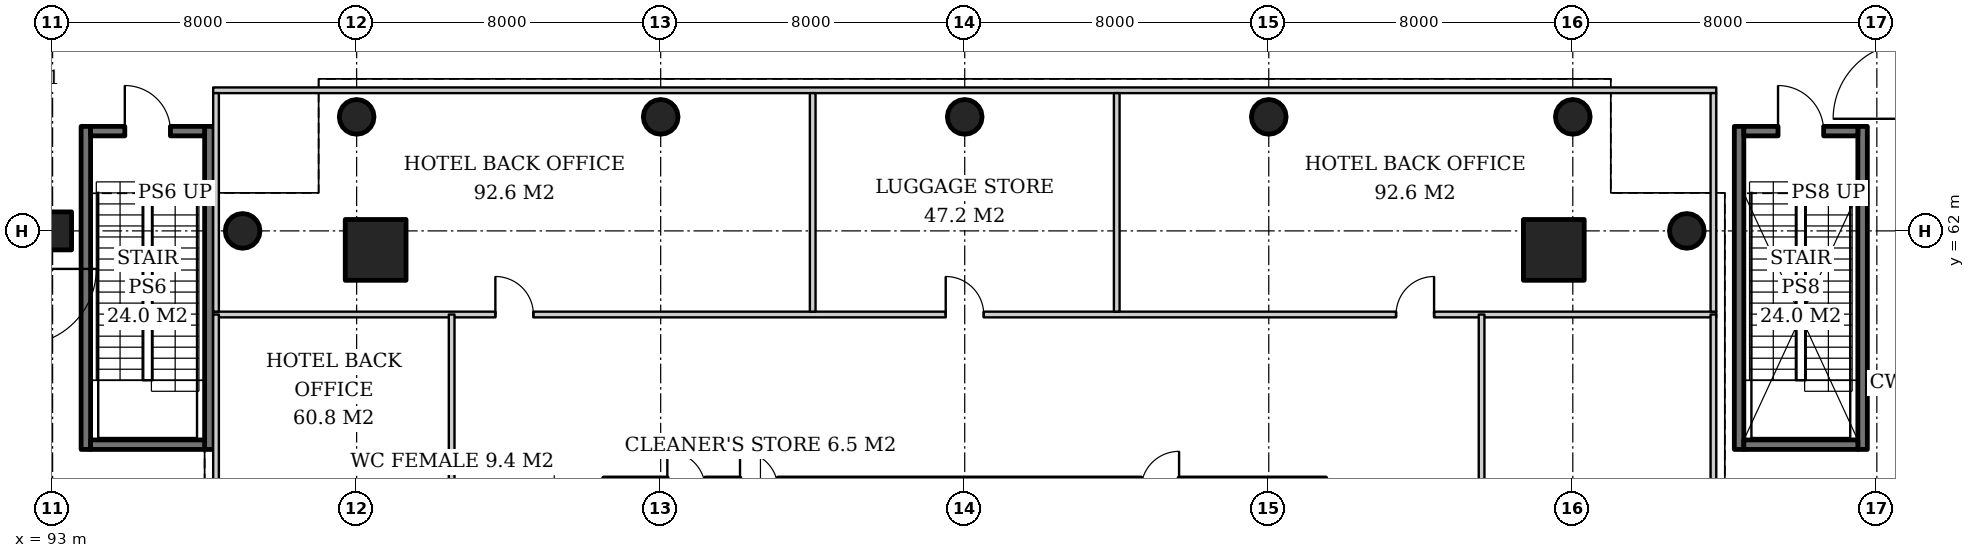
"""IFC4 building model, lengths in metres.
Left out: names, types, materials, properties, quantities, classifications, styles, units other than length and angle.
Written with IfcOpenShell. Run it as: python <this file> out.ifc"""

import sys

from ifc_helpers import new_model, si_unit, direction, frame, frame_2d, origin, origin_2d, place, context, subcontext, project, spatial, rectangle, hollow_circle, extrude, element, fill, save


model = new_model("IFC4")
c1 = context("Model", 3, precision=1e-05, world=origin(), true_north=direction((0.0, 1.0)))
c2 = subcontext(c1, "Body", "Model", "MODEL_VIEW")
j1 = project(units=[si_unit("LENGTHUNIT", "METRE"), si_unit("PLANEANGLEUNIT", "RADIAN")], contexts=[c1])
p1 = place(None, origin())
s1 = spatial("IfcSite", under=j1, at=p1, CompositionType="ELEMENT")
p2 = place(p1, origin())
s2 = spatial("IfcBuilding", under=s1, at=p2, CompositionType="ELEMENT")
p3 = place(p2, origin())
s3 = spatial("IfcBuildingStorey", under=s2, at=p3, CompositionType="ELEMENT", Elevation=0.0)
p4 = place(p3, frame((93.0, 62.0, 0.0), z_axis=(0.0, 0.0, 1.0), x_axis=(1.0, 0.0, 0.0)))
e1 = element("IfcColumn", 1, at=p4, inside=s3, PredefinedType="COLUMN", context=c2, shape_type="SweptSolid", body=[
    extrude(rectangle(XDim=1.0, YDim=1.0, at=origin_2d()), origin(), (0.0, 0.0, 1.0), 6.0),
])
p5 = place(p3, frame((132.5, 61.5, 0.0), z_axis=(0.0, 0.0, 1.0), x_axis=(1.0, 0.0, 0.0)))
e2 = element("IfcColumn", 2, at=p5, inside=s3, PredefinedType="COLUMN", context=c2, shape_type="SweptSolid", body=[
    extrude(rectangle(XDim=1.6, YDim=1.6, at=origin_2d()), origin(), (0.0, 0.0, 1.0), 6.0),
])
p6 = place(p3, frame((136.0, 62.0, 0.0), z_axis=(0.0, 0.0, 1.0), x_axis=(1.0, 0.0, 0.0)))
e3 = element("IfcColumn", 3, at=p6, inside=s3, PredefinedType="COLUMN", context=c2, shape_type="SweptSolid", body=[
    extrude(hollow_circle(Radius=0.457, WallThickness=0.03, at=origin_2d()), origin(), (0.0, 0.0, 1.0), 6.0),
])
p7 = place(p3, frame((101.5, 61.5, 0.0), z_axis=(0.0, 0.0, 1.0), x_axis=(1.0, 0.0, 0.0)))
e4 = element("IfcColumn", 4, at=p7, inside=s3, PredefinedType="COLUMN", context=c2, shape_type="SweptSolid", body=[
    extrude(rectangle(XDim=1.6, YDim=1.6, at=origin_2d()), origin(), (0.0, 0.0, 1.0), 6.0),
])
for number, where, z_axis, x_axis in (
    (5, (133.0, 65.0, 0.0), (0.0, 0.0, 1.0), (1.0, 0.0, 0.0)),
    (6, (101.0, 65.0, 0.0), (0.0, 0.0, 1.0), (1.0, 0.0, 0.0)),
    (7, (125.0, 65.0, 0.0), (0.0, 0.0, 1.0), (1.0, 0.0, 0.0)),
    (8, (117.0, 65.0, 0.0), (0.0, 0.0, 1.0), (1.0, 0.0, 0.0)),
    (9, (109.0, 65.0, 0.0), (0.0, 0.0, 1.0), (1.0, 0.0, 0.0)),
    (10, (98.0, 62.0, 0.0), (0.0, 0.0, 1.0), (1.0, 0.0, 0.0)),
):
    element("IfcColumn", number, at=place(p3, frame(where, z_axis=z_axis, x_axis=x_axis)), inside=s3, PredefinedType="COLUMN", context=c2, shape_type="SweptSolid", body=[
        extrude(hollow_circle(Radius=0.457, WallThickness=0.03, at=origin_2d()), origin(), (0.0, 0.0, 1.0), 6.0),
    ])
for number, where, z_axis, x_axis in (
    (11, (93.875, 56.25, 0.0), (0.0, 0.0, 1.0), (0.0, 1.0, 0.0)),
    (12, (97.125, 56.25, 0.0), (0.0, 0.0, 1.0), (0.0, 1.0, 0.0)),
):
    element("IfcWall", number, at=place(p3, frame(where, z_axis=z_axis, x_axis=x_axis)), inside=s3, PredefinedType="SOLIDWALL", context=c2, shape_type="SweptSolid", body=[
        extrude(rectangle(XDim=8.5, YDim=0.25, at=frame_2d((4.25, 0.0))), origin(), (0.0, 0.0, 1.0), 5.7),
    ])
p8 = place(p3, frame((94.0, 56.375, 0.0), z_axis=(0.0, 0.0, 1.0), x_axis=(1.0, 0.0, 0.0)))
e13 = element("IfcWall", 13, at=p8, inside=s3, PredefinedType="SOLIDWALL", context=c2, shape_type="SweptSolid", body=[
    extrude(rectangle(XDim=3.0, YDim=0.25, at=frame_2d((1.5, 0.0))), origin(), (0.0, 0.0, 1.0), 5.7),
])
p9 = place(p3, frame((94.0, 64.625, 0.0), z_axis=(0.0, 0.0, 1.0), x_axis=(1.0, 0.0, 0.0)))
e14 = element("IfcWall", 14, at=p9, inside=s3, PredefinedType="SOLIDWALL", context=c2, shape_type="SweptSolid", body=[
    extrude(rectangle(XDim=3.0, YDim=0.25, at=frame_2d((1.5, 0.0))), origin(), (0.0, 0.0, 1.0), 5.7),
])
p10 = place(p9, frame((0.9, 0.0, 0.0)))
e15 = element("IfcOpeningElement", 15, at=p10, cuts=e14, PredefinedType="OPENING", context=c2, shape_type="SweptSolid", body=[
    extrude(rectangle(XDim=1.2, YDim=2.1, at=frame_2d((0.6, 1.05))), frame((0.0, 0.135, 0.0), z_axis=(0.0, -1.0, 0.0), x_axis=(1.0, 0.0, 0.0)), (0.0, 0.0, 1.0), 0.27),
])
for number, where, z_axis, x_axis in (
    (16, (137.375, 56.25, 0.0), (0.0, 0.0, 1.0), (0.0, 1.0, 0.0)),
    (17, (140.625, 56.25, 0.0), (0.0, 0.0, 1.0), (0.0, 1.0, 0.0)),
):
    element("IfcWall", number, at=place(p3, frame(where, z_axis=z_axis, x_axis=x_axis)), inside=s3, PredefinedType="SOLIDWALL", context=c2, shape_type="SweptSolid", body=[
        extrude(rectangle(XDim=8.5, YDim=0.25, at=frame_2d((4.25, 0.0))), origin(), (0.0, 0.0, 1.0), 5.7),
    ])
p11 = place(p3, frame((137.5, 56.375, 0.0), z_axis=(0.0, 0.0, 1.0), x_axis=(1.0, 0.0, 0.0)))
e18 = element("IfcWall", 18, at=p11, inside=s3, PredefinedType="SOLIDWALL", context=c2, shape_type="SweptSolid", body=[
    extrude(rectangle(XDim=3.0, YDim=0.25, at=frame_2d((1.5, 0.0))), origin(), (0.0, 0.0, 1.0), 5.7),
])
p12 = place(p3, frame((137.5, 64.625, 0.0), z_axis=(0.0, 0.0, 1.0), x_axis=(1.0, 0.0, 0.0)))
e19 = element("IfcWall", 19, at=p12, inside=s3, PredefinedType="SOLIDWALL", context=c2, shape_type="SweptSolid", body=[
    extrude(rectangle(XDim=3.0, YDim=0.25, at=frame_2d((1.5, 0.0))), origin(), (0.0, 0.0, 1.0), 5.7),
])
p13 = place(p12, frame((0.9, 0.0, 0.0)))
e20 = element("IfcOpeningElement", 20, at=p13, cuts=e19, PredefinedType="OPENING", context=c2, shape_type="SweptSolid", body=[
    extrude(rectangle(XDim=1.2, YDim=2.1, at=frame_2d((0.6, 1.05))), frame((0.0, 0.135, 0.0), z_axis=(0.0, -1.0, 0.0), x_axis=(1.0, 0.0, 0.0)), (0.0, 0.0, 1.0), 0.27),
])
p14 = place(p3, frame((97.225, 59.8, 0.0), z_axis=(0.0, 0.0, 1.0), x_axis=(1.0, 0.0, 0.0)))
e21 = element("IfcWall", 21, at=p14, inside=s3, PredefinedType="PARTITIONING", context=c2, shape_type="SweptSolid", body=[
    extrude(rectangle(XDim=39.55, YDim=0.15, at=frame_2d((19.775, 0.0))), origin(), (0.0, 0.0, 1.0), 4.9),
])
p15 = place(p14, frame((7.425, 0.0, 0.0)))
e22 = element("IfcOpeningElement", 22, at=p15, cuts=e21, PredefinedType="OPENING", context=c2, shape_type="SweptSolid", body=[
    extrude(rectangle(XDim=1.0, YDim=2.1, at=frame_2d((0.5, 1.05))), frame((0.0, 0.085, 0.0), z_axis=(0.0, -1.0, 0.0), x_axis=(1.0, 0.0, 0.0)), (0.0, 0.0, 1.0), 0.17),
])
p16 = place(p14, frame((19.275, 0.0, 0.0)))
e23 = element("IfcOpeningElement", 23, at=p16, cuts=e21, PredefinedType="OPENING", context=c2, shape_type="SweptSolid", body=[
    extrude(rectangle(XDim=1.0, YDim=2.1, at=frame_2d((0.5, 1.05))), frame((0.0, 0.085, 0.0), z_axis=(0.0, -1.0, 0.0), x_axis=(1.0, 0.0, 0.0)), (0.0, 0.0, 1.0), 0.17),
])
p17 = place(p14, frame((31.125, 0.0, 0.0)))
e24 = element("IfcOpeningElement", 24, at=p17, cuts=e21, PredefinedType="OPENING", context=c2, shape_type="SweptSolid", body=[
    extrude(rectangle(XDim=1.0, YDim=2.1, at=frame_2d((0.5, 1.05))), frame((0.0, 0.085, 0.0), z_axis=(0.0, -1.0, 0.0), x_axis=(1.0, 0.0, 0.0)), (0.0, 0.0, 1.0), 0.17),
])
p18 = place(p3, frame((97.225, 65.7, 0.0), z_axis=(0.0, 0.0, 1.0), x_axis=(1.0, 0.0, 0.0)))
e25 = element("IfcWall", 25, at=p18, inside=s3, PredefinedType="PARTITIONING", context=c2, shape_type="SweptSolid", body=[
    extrude(rectangle(XDim=39.55, YDim=0.15, at=frame_2d((19.775, 0.0))), origin(), (0.0, 0.0, 1.0), 5.7),
])
for number, where, z_axis, x_axis in (
    (26, (97.3, 59.875, 0.0), (0.0, 0.0, 1.0), (0.0, 1.0, 0.0)),
    (27, (136.7, 59.875, 0.0), (0.0, 0.0, 1.0), (0.0, 1.0, 0.0)),
):
    element("IfcWall", number, at=place(p3, frame(where, z_axis=z_axis, x_axis=x_axis)), inside=s3, PredefinedType="PARTITIONING", context=c2, shape_type="SweptSolid", body=[
        extrude(rectangle(XDim=5.75, YDim=0.15, at=frame_2d((2.875, 0.0))), origin(), (0.0, 0.0, 1.0), 5.7),
    ])
for number, where, z_axis, x_axis in (
    (28, (113.0, 59.875, 0.0), (0.0, 0.0, 1.0), (0.0, 1.0, 0.0)),
    (29, (121.0, 59.875, 0.0), (0.0, 0.0, 1.0), (0.0, 1.0, 0.0)),
):
    element("IfcWall", number, at=place(p3, frame(where, z_axis=z_axis, x_axis=x_axis)), inside=s3, PredefinedType="PARTITIONING", context=c2, shape_type="SweptSolid", body=[
        extrude(rectangle(XDim=5.75, YDim=0.15, at=frame_2d((2.875, 0.0))), origin(), (0.0, 0.0, 1.0), 5.15),
    ])
p19 = place(p3, frame((97.3, 32.2, 0.0), z_axis=(0.0, 0.0, 1.0), x_axis=(0.0, 1.0, 0.0)))
e30 = element("IfcWall", 30, at=p19, inside=s3, PredefinedType="PARTITIONING", context=c2, shape_type="SweptSolid", body=[
    extrude(rectangle(XDim=27.6, YDim=0.15, at=frame_2d((13.8, 0.0))), origin(), (0.0, 0.0, 1.0), 5.7),
])
p20 = place(p3, frame((103.5, 32.2, 0.0), z_axis=(0.0, 0.0, 1.0), x_axis=(0.0, 1.0, 0.0)))
e31 = element("IfcWall", 31, at=p20, inside=s3, PredefinedType="PARTITIONING", context=c2, shape_type="SweptSolid", body=[
    extrude(rectangle(XDim=27.6, YDim=0.15, at=frame_2d((13.8, 0.0))), origin(), (0.0, 0.0, 1.0), 4.9),
])
p21 = place(p20, frame((4.4, 0.0, 0.0)))
e32 = element("IfcOpeningElement", 32, at=p21, cuts=e31, PredefinedType="OPENING", context=c2, shape_type="SweptSolid", body=[
    extrude(rectangle(XDim=1.0, YDim=2.1, at=frame_2d((0.5, 1.05))), frame((0.0, 0.085, 0.0), z_axis=(0.0, -1.0, 0.0), x_axis=(1.0, 0.0, 0.0)), (0.0, 0.0, 1.0), 0.17),
])
p22 = place(p20, frame((13.3, 0.0, 0.0)))
e33 = element("IfcOpeningElement", 33, at=p22, cuts=e31, PredefinedType="OPENING", context=c2, shape_type="SweptSolid", body=[
    extrude(rectangle(XDim=1.0, YDim=2.1, at=frame_2d((0.5, 1.05))), frame((0.0, 0.085, 0.0), z_axis=(0.0, -1.0, 0.0), x_axis=(1.0, 0.0, 0.0)), (0.0, 0.0, 1.0), 0.17),
])
p23 = place(p20, frame((22.2, 0.0, 0.0)))
e34 = element("IfcOpeningElement", 34, at=p23, cuts=e31, PredefinedType="OPENING", context=c2, shape_type="SweptSolid", body=[
    extrude(rectangle(XDim=1.0, YDim=2.1, at=frame_2d((0.5, 1.05))), frame((0.0, 0.085, 0.0), z_axis=(0.0, -1.0, 0.0), x_axis=(1.0, 0.0, 0.0)), (0.0, 0.0, 1.0), 0.17),
])
p24 = place(p3, frame((130.6, 32.2, 0.0), z_axis=(0.0, 0.0, 1.0), x_axis=(0.0, 1.0, 0.0)))
e35 = element("IfcWall", 35, at=p24, inside=s3, PredefinedType="PARTITIONING", context=c2, shape_type="SweptSolid", body=[
    extrude(rectangle(XDim=27.6, YDim=0.15, at=frame_2d((13.8, 0.0))), origin(), (0.0, 0.0, 1.0), 4.9),
])
p25 = place(p24, frame((6.4, 0.0, 0.0)))
e36 = element("IfcOpeningElement", 36, at=p25, cuts=e35, PredefinedType="OPENING", context=c2, shape_type="SweptSolid", body=[
    extrude(rectangle(XDim=1.0, YDim=2.1, at=frame_2d((0.5, 1.05))), frame((0.0, 0.085, 0.0), z_axis=(0.0, -1.0, 0.0), x_axis=(1.0, 0.0, 0.0)), (0.0, 0.0, 1.0), 0.17),
])
p26 = place(p24, frame((20.2, 0.0, 0.0)))
e37 = element("IfcOpeningElement", 37, at=p26, cuts=e35, PredefinedType="OPENING", context=c2, shape_type="SweptSolid", body=[
    extrude(rectangle(XDim=1.0, YDim=2.1, at=frame_2d((0.5, 1.05))), frame((0.0, 0.085, 0.0), z_axis=(0.0, -1.0, 0.0), x_axis=(1.0, 0.0, 0.0)), (0.0, 0.0, 1.0), 0.17),
])
p27 = place(p3, frame((136.7, 32.2, 0.0), z_axis=(0.0, 0.0, 1.0), x_axis=(0.0, 1.0, 0.0)))
e38 = element("IfcWall", 38, at=p27, inside=s3, PredefinedType="PARTITIONING", context=c2, shape_type="SweptSolid", body=[
    extrude(rectangle(XDim=27.6, YDim=0.15, at=frame_2d((13.8, 0.0))), origin(), (0.0, 0.0, 1.0), 5.7),
])
p28 = place(p10, origin())
e39 = element("IfcDoor", 39, at=p28, inside=s3, OperationType="SINGLE_SWING_LEFT", PredefinedType="DOOR", context=c2, shape_type="SweptSolid", body=[
    extrude(rectangle(XDim=1.2, YDim=2.1, at=frame_2d((0.6, 1.05))), frame((0.0, 0.025, 0.0), z_axis=(0.0, -1.0, 0.0), x_axis=(1.0, 0.0, 0.0)), (0.0, 0.0, 1.0), 0.05),
])
fill(e15, e39)
p29 = place(p13, origin())
e40 = element("IfcDoor", 40, at=p29, inside=s3, OperationType="SINGLE_SWING_LEFT", PredefinedType="DOOR", context=c2, shape_type="SweptSolid", body=[
    extrude(rectangle(XDim=1.2, YDim=2.1, at=frame_2d((0.6, 1.05))), frame((0.0, 0.025, 0.0), z_axis=(0.0, -1.0, 0.0), x_axis=(1.0, 0.0, 0.0)), (0.0, 0.0, 1.0), 0.05),
])
fill(e20, e40)
p30 = place(p15, origin())
e41 = element("IfcDoor", 41, at=p30, inside=s3, OperationType="SINGLE_SWING_LEFT", PredefinedType="DOOR", context=c2, shape_type="SweptSolid", body=[
    extrude(rectangle(XDim=1.0, YDim=2.1, at=frame_2d((0.5, 1.05))), frame((0.0, 0.025, 0.0), z_axis=(0.0, -1.0, 0.0), x_axis=(1.0, 0.0, 0.0)), (0.0, 0.0, 1.0), 0.05),
])
fill(e22, e41)
p31 = place(p16, origin())
e42 = element("IfcDoor", 42, at=p31, inside=s3, OperationType="SINGLE_SWING_LEFT", PredefinedType="DOOR", context=c2, shape_type="SweptSolid", body=[
    extrude(rectangle(XDim=1.0, YDim=2.1, at=frame_2d((0.5, 1.05))), frame((0.0, 0.025, 0.0), z_axis=(0.0, -1.0, 0.0), x_axis=(1.0, 0.0, 0.0)), (0.0, 0.0, 1.0), 0.05),
])
fill(e23, e42)
p32 = place(p17, origin())
e43 = element("IfcDoor", 43, at=p32, inside=s3, OperationType="SINGLE_SWING_RIGHT", PredefinedType="DOOR", context=c2, shape_type="SweptSolid", body=[
    extrude(rectangle(XDim=1.0, YDim=2.1, at=frame_2d((0.5, 1.05))), frame((0.0, 0.025, 0.0), z_axis=(0.0, -1.0, 0.0), x_axis=(1.0, 0.0, 0.0)), (0.0, 0.0, 1.0), 0.05),
])
fill(e24, e43)
save(model, sys.argv[1])
